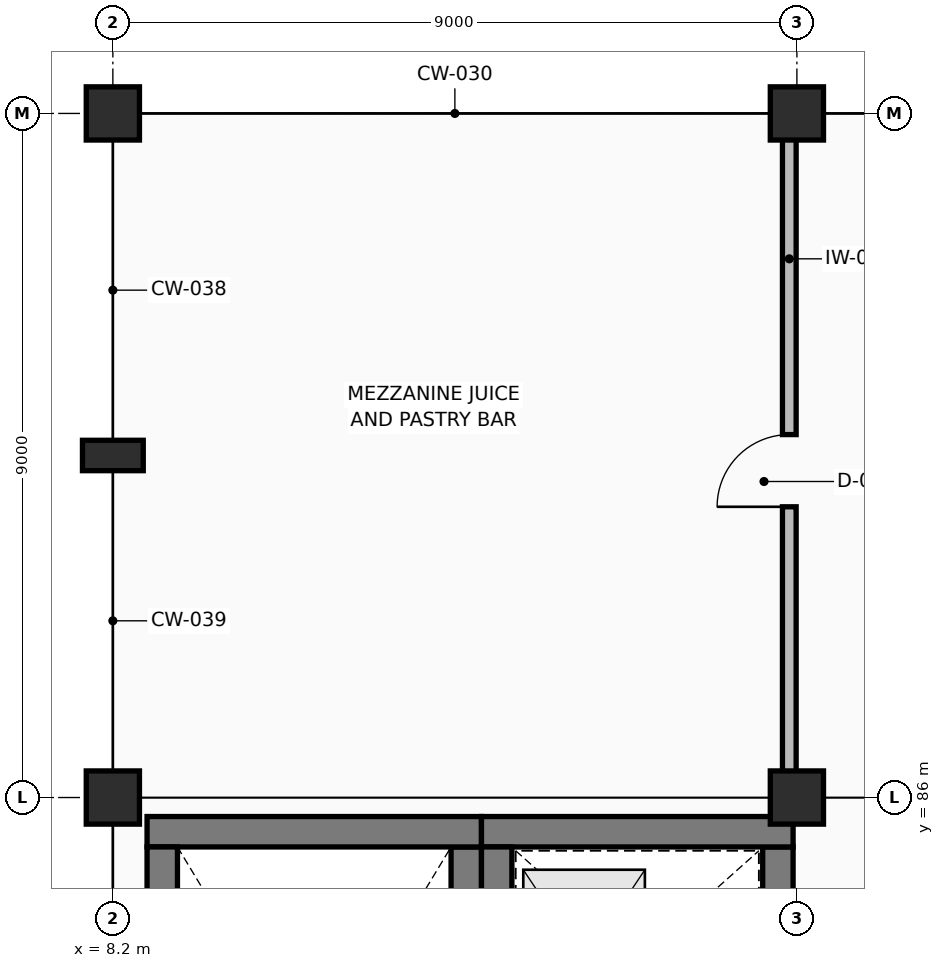
"""IFC4 building model, lengths in metres.
Left out: names, types, materials, properties, quantities, classifications, styles, units other than length and angle.
Written with IfcOpenShell. Run it as: python <this file> out.ifc"""

import sys

from ifc_helpers import new_model, si_unit, direction, frame, frame_2d, origin, origin_2d, place, context, subcontext, project, spatial, rectangle, extrude, element, fill, save


model = new_model("IFC4")
c1 = context("Model", 3, precision=1e-05, world=origin(), true_north=direction((0.0, 1.0)))
c2 = subcontext(c1, "Body", "Model", "MODEL_VIEW")
j1 = project(units=[si_unit("LENGTHUNIT", "METRE"), si_unit("PLANEANGLEUNIT", "RADIAN")], contexts=[c1])
p1 = place(None, origin())
s1 = spatial("IfcSite", under=j1, at=p1, CompositionType="ELEMENT")
p2 = place(p1, origin())
s2 = spatial("IfcBuilding", under=s1, at=p2, CompositionType="ELEMENT")
p3 = place(p2, frame((0.0, 0.0, 4.8)))
s3 = spatial("IfcBuildingStorey", under=s2, at=p3, CompositionType="ELEMENT", Elevation=4.8)
for number, where, z_axis, x_axis in (
    (1, (8.2, 86.0, 0.0), (0.0, 0.0, 1.0), (1.0, 0.0, 0.0)),
    (2, (8.2, 95.0, 0.0), (0.0, 0.0, 1.0), (1.0, 0.0, 0.0)),
    (3, (17.2, 86.0, 0.0), (0.0, 0.0, 1.0), (1.0, 0.0, 0.0)),
    (4, (17.2, 95.0, 0.0), (0.0, 0.0, 1.0), (1.0, 0.0, 0.0)),
):
    element("IfcColumn", number, at=place(p3, frame(where, z_axis=z_axis, x_axis=x_axis)), inside=s3, PredefinedType="COLUMN", context=c2, shape_type="SweptSolid", body=[
        extrude(rectangle(XDim=0.7, YDim=0.7, at=origin_2d()), origin(), (0.0, 0.0, 1.0), 4.8),
    ])
p4 = place(p3, frame((8.2, 90.5, 0.0), z_axis=(0.0, 0.0, 1.0), x_axis=(0.0, 1.0, 0.0)))
e5 = element("IfcColumn", 5, at=p4, inside=s3, PredefinedType="PILASTER", context=c2, shape_type="SweptSolid", body=[
    extrude(rectangle(XDim=0.4, YDim=0.8, at=origin_2d()), origin(), (0.0, 0.0, 1.0), 4.8),
])
p5 = place(p3, frame((12.85, 77.75, 0.0), z_axis=(0.0, 0.0, 1.0), x_axis=(0.0, 1.0, 0.0)))
e6 = element("IfcWall", 6, at=p5, inside=s3, PredefinedType="SHEAR", context=c2, shape_type="SweptSolid", body=[
    extrude(rectangle(XDim=7.6, YDim=0.4, at=frame_2d((3.8, 0.0))), origin(), (0.0, 0.0, 1.0), 4.49),
])
p6 = place(p5, frame((0.35, 0.0, 0.0)))
e7 = element("IfcOpeningElement", 7, at=p6, cuts=e6, PredefinedType="OPENING", context=c2, shape_type="SweptSolid", body=[
    extrude(rectangle(XDim=1.1, YDim=2.2, at=frame_2d((0.55, 1.1))), frame((0.0, 0.21, 0.0), z_axis=(0.0, -1.0, 0.0), x_axis=(1.0, 0.0, 0.0)), (0.0, 0.0, 1.0), 0.42),
])
p7 = place(p3, frame((13.05, 85.55, 0.0), z_axis=(0.0, 0.0, 1.0), x_axis=(-1.0, 0.0, 0.0)))
e8 = element("IfcWall", 8, at=p7, inside=s3, PredefinedType="SHEAR", context=c2, shape_type="SweptSolid", body=[
    extrude(rectangle(XDim=4.4, YDim=0.4, at=frame_2d((2.2, 0.0))), origin(), (0.0, 0.0, 1.0), 4.49),
])
p8 = place(p3, frame((8.85, 85.35, 0.0), z_axis=(0.0, 0.0, 1.0), x_axis=(0.0, -1.0, 0.0)))
e9 = element("IfcWall", 9, at=p8, inside=s3, PredefinedType="SHEAR", context=c2, shape_type="SweptSolid", body=[
    extrude(rectangle(XDim=7.6, YDim=0.4, at=frame_2d((3.8, 0.0))), origin(), (0.0, 0.0, 1.0), 4.49),
])
p9 = place(p3, frame((16.95, 82.4, 0.0), z_axis=(0.0, 0.0, 1.0), x_axis=(0.0, 1.0, 0.0)))
e10 = element("IfcWall", 10, at=p9, inside=s3, PredefinedType="SHEAR", context=c2, shape_type="SweptSolid", body=[
    extrude(rectangle(XDim=2.95, YDim=0.4, at=frame_2d((1.475, 0.0))), origin(), (0.0, 0.0, 1.0), 4.49),
])
p10 = place(p3, frame((17.15, 85.55, 0.0), z_axis=(0.0, 0.0, 1.0), x_axis=(-1.0, 0.0, 0.0)))
e11 = element("IfcWall", 11, at=p10, inside=s3, PredefinedType="SHEAR", context=c2, shape_type="SweptSolid", body=[
    extrude(rectangle(XDim=4.1, YDim=0.4, at=frame_2d((2.05, 0.0))), origin(), (0.0, 0.0, 1.0), 4.49),
])
p11 = place(p3, frame((13.25, 85.35, 0.0), z_axis=(0.0, 0.0, 1.0), x_axis=(0.0, -1.0, 0.0)))
e12 = element("IfcWall", 12, at=p11, inside=s3, PredefinedType="SHEAR", context=c2, shape_type="SweptSolid", body=[
    extrude(rectangle(XDim=2.95, YDim=0.4, at=frame_2d((1.475, 0.0))), origin(), (0.0, 0.0, 1.0), 4.49),
])
p12 = place(p3, frame((17.1, 85.8, 0.0), z_axis=(0.0, 0.0, 1.0), x_axis=(0.0, 1.0, 0.0)))
e13 = element("IfcWall", 13, at=p12, inside=s3, PredefinedType="STANDARD", context=c2, shape_type="SweptSolid", body=[
    extrude(rectangle(XDim=9.0, YDim=0.18, at=frame_2d((4.5, 0.0))), origin(), (0.0, 0.0, 1.0), 3.762),
])
p13 = place(p12, frame((4.025, 0.0, 0.0)))
e14 = element("IfcOpeningElement", 14, at=p13, cuts=e13, PredefinedType="OPENING", context=c2, shape_type="SweptSolid", body=[
    extrude(rectangle(XDim=0.95, YDim=2.15, at=frame_2d((0.475, 1.075))), frame((0.0, 0.1, 0.0), z_axis=(0.0, -1.0, 0.0), x_axis=(1.0, 0.0, 0.0)), (0.0, 0.0, 1.0), 0.2),
])
p14 = place(p13, origin())
e15 = element("IfcDoor", 15, at=p14, inside=s3, OperationType="SINGLE_SWING_LEFT", PredefinedType="DOOR", context=c2, shape_type="SweptSolid", body=[
    extrude(rectangle(XDim=0.95, YDim=2.15, at=frame_2d((0.475, 1.075))), frame((0.0, 0.025, 0.0), z_axis=(0.0, -1.0, 0.0), x_axis=(1.0, 0.0, 0.0)), (0.0, 0.0, 1.0), 0.05),
])
fill(e14, e15)
save(model, sys.argv[1])
